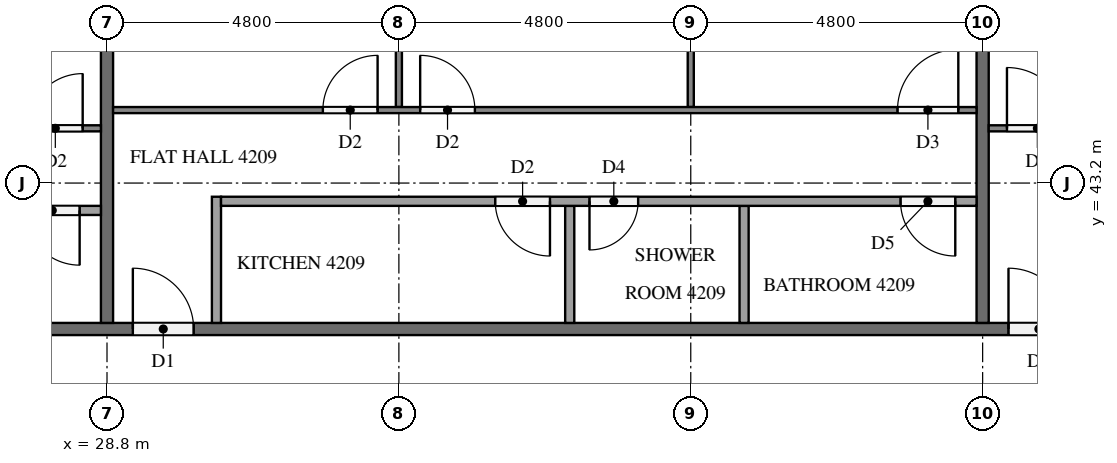
"""IFC4 building model, lengths in metres.
Left out: names, types, materials, properties, quantities, classifications, styles, units other than length and angle.
Written with IfcOpenShell. Run it as: python <this file> out.ifc"""

import sys

from ifc_helpers import new_model, si_unit, direction, frame, frame_2d, origin, place, context, subcontext, project, spatial, rectangle, extrude, element, fill, save


model = new_model("IFC4")
c1 = context("Model", 3, precision=1e-05, world=origin(), true_north=direction((0.0, 1.0)))
c2 = subcontext(c1, "Body", "Model", "MODEL_VIEW")
j1 = project(units=[si_unit("LENGTHUNIT", "METRE"), si_unit("PLANEANGLEUNIT", "RADIAN")], contexts=[c1])
p1 = place(None, origin())
s1 = spatial("IfcSite", under=j1, at=p1, CompositionType="ELEMENT")
p2 = place(p1, origin())
s2 = spatial("IfcBuilding", under=s1, at=p2, CompositionType="ELEMENT")
p3 = place(p2, frame((0.0, 0.0, 163.0)))
s3 = spatial("IfcBuildingStorey", under=s2, at=p3, CompositionType="ELEMENT", Elevation=163.0)
p4 = place(p3, frame((11.9, 40.8, 0.0), z_axis=(0.0, 0.0, 1.0), x_axis=(1.0, 0.0, 0.0)))
e1 = element("IfcWall", 1, at=p4, inside=s3, PredefinedType="PARTITIONING", context=c2, shape_type="SweptSolid", body=[
    extrude(rectangle(XDim=38.6, YDim=0.2, at=frame_2d((19.3, 0.0))), origin(), (0.0, 0.0, 1.0), 3.2),
])
p5 = place(p4, frame((31.725, 0.0, 0.0)))
e2 = element("IfcOpeningElement", 2, at=p5, cuts=e1, PredefinedType="OPENING", context=c2, shape_type="SweptSolid", body=[
    extrude(rectangle(XDim=1.0, YDim=2.1, at=frame_2d((0.5, 1.05))), frame((0.0, 0.11, 0.0), z_axis=(0.0, -1.0, 0.0), x_axis=(1.0, 0.0, 0.0)), (0.0, 0.0, 1.0), 0.22),
])
p6 = place(p4, frame((17.325, 0.0, 0.0)))
e3 = element("IfcOpeningElement", 3, at=p6, cuts=e1, PredefinedType="OPENING", context=c2, shape_type="SweptSolid", body=[
    extrude(rectangle(XDim=1.0, YDim=2.1, at=frame_2d((0.5, 1.05))), frame((0.0, 0.11, 0.0), z_axis=(0.0, -1.0, 0.0), x_axis=(1.0, 0.0, 0.0)), (0.0, 0.0, 1.0), 0.22),
])
p7 = place(p4, frame((0.525, 0.0, 0.0)))
e4 = element("IfcOpeningElement", 4, at=p7, cuts=e1, PredefinedType="OPENING", context=c2, shape_type="SweptSolid", body=[
    extrude(rectangle(XDim=1.0, YDim=2.1, at=frame_2d((0.5, 1.05))), frame((0.0, 0.11, 0.0), z_axis=(0.0, -1.0, 0.0), x_axis=(1.0, 0.0, 0.0)), (0.0, 0.0, 1.0), 0.22),
])
p8 = place(p3, frame((43.2, 47.625, 0.0), z_axis=(0.0, 0.0, 1.0), x_axis=(0.0, -1.0, 0.0)))
e5 = element("IfcWall", 5, at=p8, inside=s3, PredefinedType="PARTITIONING", context=c2, shape_type="SweptSolid", body=[
    extrude(rectangle(XDim=6.725, YDim=0.2, at=frame_2d((3.363, 0.0))), origin(), (0.0, 0.0, 1.0), 3.2),
])
p9 = place(p3, frame((28.8, 47.9, 0.0), z_axis=(0.0, 0.0, 1.0), x_axis=(0.0, -1.0, 0.0)))
e6 = element("IfcWall", 6, at=p9, inside=s3, PredefinedType="PARTITIONING", context=c2, shape_type="SweptSolid", body=[
    extrude(rectangle(XDim=7.0, YDim=0.2, at=frame_2d((3.5, 0.0))), origin(), (0.0, 0.0, 1.0), 3.2),
])
p10 = place(p3, frame((43.3, 44.1, 0.0), z_axis=(0.0, 0.0, 1.0), x_axis=(1.0, 0.0, 0.0)))
e7 = element("IfcWall", 7, at=p10, inside=s3, PredefinedType="PARTITIONING", context=c2, shape_type="SweptSolid", body=[
    extrude(rectangle(XDim=7.0, YDim=0.1, at=frame_2d((3.5, 0.0))), origin(), (0.0, 0.0, 1.0), 3.2),
])
p11 = place(p10, frame((0.3, 0.0, 0.0)))
e8 = element("IfcOpeningElement", 8, at=p11, cuts=e7, PredefinedType="OPENING", context=c2, shape_type="SweptSolid", body=[
    extrude(rectangle(XDim=1.0, YDim=2.1, at=frame_2d((0.5, 1.05))), frame((0.0, 0.06, 0.0), z_axis=(0.0, -1.0, 0.0), x_axis=(1.0, 0.0, 0.0)), (0.0, 0.0, 1.0), 0.12),
])
p12 = place(p3, frame((33.6, 44.45, 0.0), z_axis=(0.0, 0.0, 1.0), x_axis=(0.0, 1.0, 0.0)))
e9 = element("IfcWall", 9, at=p12, inside=s3, PredefinedType="PARTITIONING", context=c2, shape_type="SweptSolid", body=[
    extrude(rectangle(XDim=3.175, YDim=0.1, at=frame_2d((1.587, 0.0))), origin(), (0.0, 0.0, 1.0), 3.2),
])
p13 = place(p3, frame((38.4, 44.45, 0.0), z_axis=(0.0, 0.0, 1.0), x_axis=(0.0, 1.0, 0.0)))
e10 = element("IfcWall", 10, at=p13, inside=s3, PredefinedType="PARTITIONING", context=c2, shape_type="SweptSolid", body=[
    extrude(rectangle(XDim=3.45, YDim=0.1, at=frame_2d((1.725, 0.0))), origin(), (0.0, 0.0, 1.0), 3.2),
])
p14 = place(p3, frame((28.9, 44.4, 0.0), z_axis=(0.0, 0.0, 1.0), x_axis=(1.0, 0.0, 0.0)))
e11 = element("IfcWall", 11, at=p14, inside=s3, PredefinedType="PARTITIONING", context=c2, shape_type="SweptSolid", body=[
    extrude(rectangle(XDim=14.2, YDim=0.1, at=frame_2d((7.1, 0.0))), origin(), (0.0, 0.0, 1.0), 3.2),
])
p15 = place(p14, frame((3.45, 0.0, 0.0)))
e12 = element("IfcOpeningElement", 12, at=p15, cuts=e11, PredefinedType="OPENING", context=c2, shape_type="SweptSolid", body=[
    extrude(rectangle(XDim=0.9, YDim=2.1, at=frame_2d((0.45, 1.05))), frame((0.0, 0.06, 0.0), z_axis=(0.0, -1.0, 0.0), x_axis=(1.0, 0.0, 0.0)), (0.0, 0.0, 1.0), 0.12),
])
p16 = place(p14, frame((5.05, 0.0, 0.0)))
e13 = element("IfcOpeningElement", 13, at=p16, cuts=e11, PredefinedType="OPENING", context=c2, shape_type="SweptSolid", body=[
    extrude(rectangle(XDim=0.9, YDim=2.1, at=frame_2d((0.45, 1.05))), frame((0.0, 0.06, 0.0), z_axis=(0.0, -1.0, 0.0), x_axis=(1.0, 0.0, 0.0)), (0.0, 0.0, 1.0), 0.12),
])
p17 = place(p14, frame((12.9, 0.0, 0.0)))
e14 = element("IfcOpeningElement", 14, at=p17, cuts=e11, PredefinedType="OPENING", context=c2, shape_type="SweptSolid", body=[
    extrude(rectangle(XDim=1.0, YDim=2.1, at=frame_2d((0.5, 1.05))), frame((0.0, 0.06, 0.0), z_axis=(0.0, -1.0, 0.0), x_axis=(1.0, 0.0, 0.0)), (0.0, 0.0, 1.0), 0.12),
])
for number, where, z_axis, x_axis in (
    (15, (36.41, 40.9, 0.0), (0.0, 0.0, 1.0), (0.0, 1.0, 0.0)),
    (16, (39.277, 40.9, 0.0), (0.0, 0.0, 1.0), (0.0, 1.0, 0.0)),
):
    element("IfcWall", number, at=place(p3, frame(where, z_axis=z_axis, x_axis=x_axis)), inside=s3, PredefinedType="PARTITIONING", context=c2, shape_type="SweptSolid", body=[
        extrude(rectangle(XDim=1.925, YDim=0.15, at=frame_2d((0.962, 0.0))), origin(), (0.0, 0.0, 1.0), 3.2),
    ])
p18 = place(p3, frame((30.6, 40.9, 0.0), z_axis=(0.0, 0.0, 1.0), x_axis=(0.0, 1.0, 0.0)))
e17 = element("IfcWall", 17, at=p18, inside=s3, PredefinedType="PARTITIONING", context=c2, shape_type="SweptSolid", body=[
    extrude(rectangle(XDim=2.075, YDim=0.15, at=frame_2d((1.038, 0.0))), origin(), (0.0, 0.0, 1.0), 3.2),
])
p19 = place(p3, frame((43.1, 42.9, 0.0), z_axis=(0.0, 0.0, 1.0), x_axis=(-1.0, 0.0, 0.0)))
e18 = element("IfcWall", 18, at=p19, inside=s3, PredefinedType="PARTITIONING", context=c2, shape_type="SweptSolid", body=[
    extrude(rectangle(XDim=12.425, YDim=0.15, at=frame_2d((6.212, 0.0))), origin(), (0.0, 0.0, 1.0), 3.2),
])
p20 = place(p19, frame((7.015, 0.0, 0.0)))
e19 = element("IfcOpeningElement", 19, at=p20, cuts=e18, PredefinedType="OPENING", context=c2, shape_type="SweptSolid", body=[
    extrude(rectangle(XDim=0.9, YDim=2.1, at=frame_2d((0.45, 1.05))), frame((0.0, 0.085, 0.0), z_axis=(0.0, -1.0, 0.0), x_axis=(1.0, 0.0, 0.0)), (0.0, 0.0, 1.0), 0.17),
])
p21 = place(p19, frame((5.565, 0.0, 0.0)))
e20 = element("IfcOpeningElement", 20, at=p21, cuts=e18, PredefinedType="OPENING", context=c2, shape_type="SweptSolid", body=[
    extrude(rectangle(XDim=0.8, YDim=2.1, at=frame_2d((0.4, 1.05))), frame((0.0, 0.085, 0.0), z_axis=(0.0, -1.0, 0.0), x_axis=(1.0, 0.0, 0.0)), (0.0, 0.0, 1.0), 0.17),
])
p22 = place(p19, frame((0.35, 0.0, 0.0)))
e21 = element("IfcOpeningElement", 21, at=p22, cuts=e18, PredefinedType="OPENING", context=c2, shape_type="SweptSolid", body=[
    extrude(rectangle(XDim=0.9, YDim=2.1, at=frame_2d((0.45, 1.05))), frame((0.0, 0.085, 0.0), z_axis=(0.0, -1.0, 0.0), x_axis=(1.0, 0.0, 0.0)), (0.0, 0.0, 1.0), 0.17),
])
p23 = place(p3, frame((12.1, 44.1, 0.0), z_axis=(0.0, 0.0, 1.0), x_axis=(1.0, 0.0, 0.0)))
e22 = element("IfcWall", 22, at=p23, inside=s3, PredefinedType="PARTITIONING", context=c2, shape_type="SweptSolid", body=[
    extrude(rectangle(XDim=16.6, YDim=0.1, at=frame_2d((8.3, 0.0))), origin(), (0.0, 0.0, 1.0), 3.2),
])
p24 = place(p23, frame((3.45, 0.0, 0.0)))
e23 = element("IfcOpeningElement", 23, at=p24, cuts=e22, PredefinedType="OPENING", context=c2, shape_type="SweptSolid", body=[
    extrude(rectangle(XDim=0.9, YDim=2.1, at=frame_2d((0.45, 1.05))), frame((0.0, 0.06, 0.0), z_axis=(0.0, -1.0, 0.0), x_axis=(1.0, 0.0, 0.0)), (0.0, 0.0, 1.0), 0.12),
])
p25 = place(p23, frame((5.05, 0.0, 0.0)))
e24 = element("IfcOpeningElement", 24, at=p25, cuts=e22, PredefinedType="OPENING", context=c2, shape_type="SweptSolid", body=[
    extrude(rectangle(XDim=1.0, YDim=2.1, at=frame_2d((0.5, 1.05))), frame((0.0, 0.06, 0.0), z_axis=(0.0, -1.0, 0.0), x_axis=(1.0, 0.0, 0.0)), (0.0, 0.0, 1.0), 0.12),
])
p26 = place(p23, frame((15.4, 0.0, 0.0)))
e25 = element("IfcOpeningElement", 25, at=p26, cuts=e22, PredefinedType="OPENING", context=c2, shape_type="SweptSolid", body=[
    extrude(rectangle(XDim=0.9, YDim=2.1, at=frame_2d((0.45, 1.05))), frame((0.0, 0.06, 0.0), z_axis=(0.0, -1.0, 0.0), x_axis=(1.0, 0.0, 0.0)), (0.0, 0.0, 1.0), 0.12),
])
p27 = place(p3, frame((28.7, 42.75, 0.0), z_axis=(0.0, 0.0, 1.0), x_axis=(-1.0, 0.0, 0.0)))
e26 = element("IfcWall", 26, at=p27, inside=s3, PredefinedType="PARTITIONING", context=c2, shape_type="SweptSolid", body=[
    extrude(rectangle(XDim=14.825, YDim=0.15, at=frame_2d((7.413, 0.0))), origin(), (0.0, 0.0, 1.0), 3.2),
])
p28 = place(p27, frame((10.588, 0.0, 0.0)))
e27 = element("IfcOpeningElement", 27, at=p28, cuts=e26, PredefinedType="OPENING", context=c2, shape_type="SweptSolid", body=[
    extrude(rectangle(XDim=0.9, YDim=2.1, at=frame_2d((0.45, 1.05))), frame((0.0, 0.085, 0.0), z_axis=(0.0, -1.0, 0.0), x_axis=(1.0, 0.0, 0.0)), (0.0, 0.0, 1.0), 0.17),
])
p29 = place(p27, frame((9.138, 0.0, 0.0)))
e28 = element("IfcOpeningElement", 28, at=p29, cuts=e26, PredefinedType="OPENING", context=c2, shape_type="SweptSolid", body=[
    extrude(rectangle(XDim=0.8, YDim=2.1, at=frame_2d((0.4, 1.05))), frame((0.0, 0.085, 0.0), z_axis=(0.0, -1.0, 0.0), x_axis=(1.0, 0.0, 0.0)), (0.0, 0.0, 1.0), 0.17),
])
p30 = place(p27, frame((0.35, 0.0, 0.0)))
e29 = element("IfcOpeningElement", 29, at=p30, cuts=e26, PredefinedType="OPENING", context=c2, shape_type="SweptSolid", body=[
    extrude(rectangle(XDim=0.9, YDim=2.1, at=frame_2d((0.45, 1.05))), frame((0.0, 0.085, 0.0), z_axis=(0.0, -1.0, 0.0), x_axis=(1.0, 0.0, 0.0)), (0.0, 0.0, 1.0), 0.17),
])
p31 = place(p5, origin())
e30 = element("IfcDoor", 30, at=p31, inside=s3, OperationType="SINGLE_SWING_LEFT", PredefinedType="DOOR", context=c2, shape_type="SweptSolid", body=[
    extrude(rectangle(XDim=1.0, YDim=2.1, at=frame_2d((0.5, 1.05))), frame((0.0, 0.025, 0.0), z_axis=(0.0, -1.0, 0.0), x_axis=(1.0, 0.0, 0.0)), (0.0, 0.0, 1.0), 0.05),
])
fill(e2, e30)
p32 = place(p6, origin())
e31 = element("IfcDoor", 31, at=p32, inside=s3, OperationType="SINGLE_SWING_LEFT", PredefinedType="DOOR", context=c2, shape_type="SweptSolid", body=[
    extrude(rectangle(XDim=1.0, YDim=2.1, at=frame_2d((0.5, 1.05))), frame((0.0, 0.025, 0.0), z_axis=(0.0, -1.0, 0.0), x_axis=(1.0, 0.0, 0.0)), (0.0, 0.0, 1.0), 0.05),
])
fill(e3, e31)
p33 = place(p11, origin())
e32 = element("IfcDoor", 32, at=p33, inside=s3, OperationType="SINGLE_SWING_LEFT", PredefinedType="DOOR", context=c2, shape_type="SweptSolid", body=[
    extrude(rectangle(XDim=1.0, YDim=2.1, at=frame_2d((0.5, 1.05))), frame((0.0, 0.025, 0.0), z_axis=(0.0, -1.0, 0.0), x_axis=(1.0, 0.0, 0.0)), (0.0, 0.0, 1.0), 0.05),
])
fill(e8, e32)
p34 = place(p15, origin())
e33 = element("IfcDoor", 33, at=p34, inside=s3, OperationType="SINGLE_SWING_RIGHT", PredefinedType="DOOR", context=c2, shape_type="SweptSolid", body=[
    extrude(rectangle(XDim=0.9, YDim=2.1, at=frame_2d((0.45, 1.05))), frame((0.0, 0.025, 0.0), z_axis=(0.0, -1.0, 0.0), x_axis=(1.0, 0.0, 0.0)), (0.0, 0.0, 1.0), 0.05),
])
fill(e12, e33)
p35 = place(p16, origin())
e34 = element("IfcDoor", 34, at=p35, inside=s3, OperationType="SINGLE_SWING_LEFT", PredefinedType="DOOR", context=c2, shape_type="SweptSolid", body=[
    extrude(rectangle(XDim=0.9, YDim=2.1, at=frame_2d((0.45, 1.05))), frame((0.0, 0.025, 0.0), z_axis=(0.0, -1.0, 0.0), x_axis=(1.0, 0.0, 0.0)), (0.0, 0.0, 1.0), 0.05),
])
fill(e13, e34)
p36 = place(p17, origin())
e35 = element("IfcDoor", 35, at=p36, inside=s3, OperationType="SINGLE_SWING_RIGHT", PredefinedType="DOOR", context=c2, shape_type="SweptSolid", body=[
    extrude(rectangle(XDim=1.0, YDim=2.1, at=frame_2d((0.5, 1.05))), frame((0.0, 0.025, 0.0), z_axis=(0.0, -1.0, 0.0), x_axis=(1.0, 0.0, 0.0)), (0.0, 0.0, 1.0), 0.05),
])
fill(e14, e35)
p37 = place(p20, origin())
e36 = element("IfcDoor", 36, at=p37, inside=s3, OperationType="SINGLE_SWING_LEFT", PredefinedType="DOOR", context=c2, shape_type="SweptSolid", body=[
    extrude(rectangle(XDim=0.9, YDim=2.1, at=frame_2d((0.45, 1.05))), frame((0.0, 0.025, 0.0), z_axis=(0.0, -1.0, 0.0), x_axis=(1.0, 0.0, 0.0)), (0.0, 0.0, 1.0), 0.05),
])
fill(e19, e36)
p38 = place(p21, origin())
e37 = element("IfcDoor", 37, at=p38, inside=s3, OperationType="SINGLE_SWING_RIGHT", PredefinedType="DOOR", context=c2, shape_type="SweptSolid", body=[
    extrude(rectangle(XDim=0.8, YDim=2.1, at=frame_2d((0.4, 1.05))), frame((0.0, 0.025, 0.0), z_axis=(0.0, -1.0, 0.0), x_axis=(1.0, 0.0, 0.0)), (0.0, 0.0, 1.0), 0.05),
])
fill(e20, e37)
p39 = place(p22, origin())
e38 = element("IfcDoor", 38, at=p39, inside=s3, OperationType="SINGLE_SWING_LEFT", PredefinedType="DOOR", context=c2, shape_type="SweptSolid", body=[
    extrude(rectangle(XDim=0.9, YDim=2.1, at=frame_2d((0.45, 1.05))), frame((0.0, 0.025, 0.0), z_axis=(0.0, -1.0, 0.0), x_axis=(1.0, 0.0, 0.0)), (0.0, 0.0, 1.0), 0.05),
])
fill(e21, e38)
p40 = place(p26, origin())
e39 = element("IfcDoor", 39, at=p40, inside=s3, OperationType="SINGLE_SWING_RIGHT", PredefinedType="DOOR", context=c2, shape_type="SweptSolid", body=[
    extrude(rectangle(XDim=0.9, YDim=2.1, at=frame_2d((0.45, 1.05))), frame((0.0, 0.025, 0.0), z_axis=(0.0, -1.0, 0.0), x_axis=(1.0, 0.0, 0.0)), (0.0, 0.0, 1.0), 0.05),
])
fill(e25, e39)
p41 = place(p30, origin())
e40 = element("IfcDoor", 40, at=p41, inside=s3, OperationType="SINGLE_SWING_LEFT", PredefinedType="DOOR", context=c2, shape_type="SweptSolid", body=[
    extrude(rectangle(XDim=0.9, YDim=2.1, at=frame_2d((0.45, 1.05))), frame((0.0, 0.025, 0.0), z_axis=(0.0, -1.0, 0.0), x_axis=(1.0, 0.0, 0.0)), (0.0, 0.0, 1.0), 0.05),
])
fill(e29, e40)
save(model, sys.argv[1])
